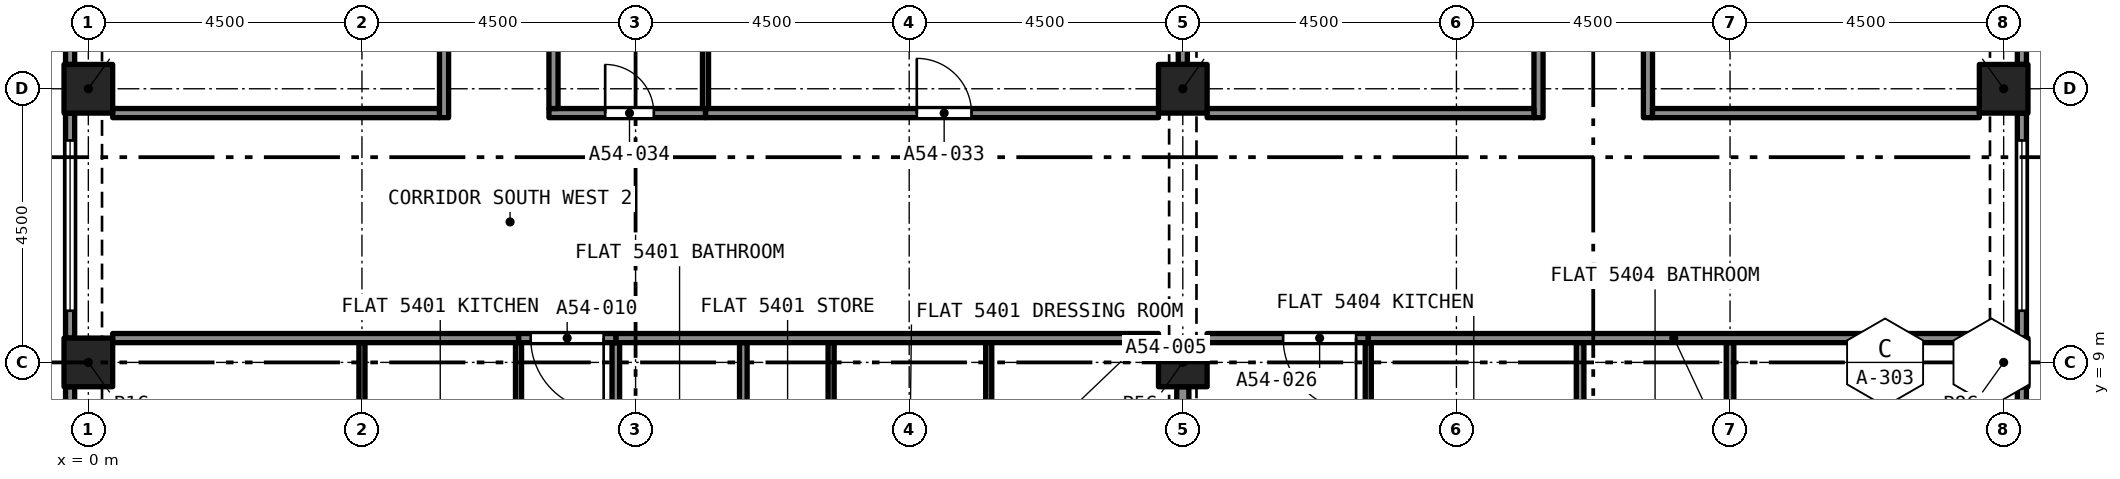
"""IFC4 building model, lengths in metres.
Left out: names, types, materials, properties, quantities, classifications, styles, units other than length and angle.
Written with IfcOpenShell. Run it as: python <this file> out.ifc"""

import sys

from ifc_helpers import new_model, si_unit, direction, frame, frame_2d, origin, origin_2d, place, context, subcontext, project, spatial, rectangle, extrude, element, fill, save


model = new_model("IFC4")
c1 = context("Model", 3, precision=1e-05, world=origin(), true_north=direction((0.0, 1.0)))
c2 = subcontext(c1, "Body", "Model", "MODEL_VIEW")
j1 = project(units=[si_unit("LENGTHUNIT", "METRE"), si_unit("PLANEANGLEUNIT", "RADIAN")], contexts=[c1])
p1 = place(None, origin())
s1 = spatial("IfcSite", under=j1, at=p1, CompositionType="ELEMENT")
p2 = place(p1, origin())
s2 = spatial("IfcBuilding", under=s1, at=p2, CompositionType="ELEMENT")
p3 = place(p2, frame((0.0, 0.0, 195.5)))
s3 = spatial("IfcBuildingStorey", under=s2, at=p3, CompositionType="ELEMENT", Elevation=195.5)
for number, where, z_axis, x_axis in (
    (1, (0.0, 9.0, 0.0), (0.0, 0.0, 1.0), (1.0, 0.0, 0.0)),
    (2, (18.0, 9.0, 0.0), (0.0, 0.0, 1.0), (1.0, 0.0, 0.0)),
    (3, (31.5, 9.0, 0.0), (0.0, 0.0, 1.0), (1.0, 0.0, 0.0)),
    (4, (0.0, 13.5, 0.0), (0.0, 0.0, 1.0), (1.0, 0.0, 0.0)),
    (5, (18.0, 13.5, 0.0), (0.0, 0.0, 1.0), (1.0, 0.0, 0.0)),
    (6, (31.5, 13.5, 0.0), (0.0, 0.0, 1.0), (1.0, 0.0, 0.0)),
):
    element("IfcColumn", number, at=place(p3, frame(where, z_axis=z_axis, x_axis=x_axis)), inside=s3, PredefinedType="COLUMN", context=c2, shape_type="SweptSolid", body=[
        extrude(rectangle(XDim=0.8, YDim=0.8, at=origin_2d()), origin(), (0.0, 0.0, 1.0), 3.2),
    ])
p4 = place(p3, frame((31.8, 8.6, 0.0), z_axis=(0.0, 0.0, 1.0), x_axis=(0.0, -1.0, 0.0)))
e7 = element("IfcWall", 7, at=p4, inside=s3, PredefinedType="SOLIDWALL", context=c2, shape_type="SweptSolid", body=[
    extrude(rectangle(XDim=3.7, YDim=0.15, at=frame_2d((1.85, 0.0))), origin(), (0.0, 0.0, 1.0), 3.2),
])
p5 = place(p4, frame((0.45, 0.0, 0.45)))
e8 = element("IfcOpeningElement", 8, at=p5, cuts=e7, PredefinedType="OPENING", context=c2, shape_type="SweptSolid", body=[
    extrude(rectangle(XDim=2.8, YDim=1.95, at=frame_2d((1.4, 0.975))), frame((0.0, 0.085, 0.0), z_axis=(0.0, -1.0, 0.0), x_axis=(1.0, 0.0, 0.0)), (0.0, 0.0, 1.0), 0.17),
])
p6 = place(p3, frame((31.8, 13.1, 0.0), z_axis=(0.0, 0.0, 1.0), x_axis=(0.0, -1.0, 0.0)))
e9 = element("IfcWall", 9, at=p6, inside=s3, PredefinedType="SOLIDWALL", context=c2, shape_type="SweptSolid", body=[
    extrude(rectangle(XDim=3.7, YDim=0.15, at=frame_2d((1.85, 0.0))), origin(), (0.0, 0.0, 1.0), 3.2),
])
p7 = place(p6, frame((0.45, 0.0, 0.45)))
e10 = element("IfcOpeningElement", 10, at=p7, cuts=e9, PredefinedType="OPENING", context=c2, shape_type="SweptSolid", body=[
    extrude(rectangle(XDim=2.8, YDim=1.95, at=frame_2d((1.4, 0.975))), frame((0.0, 0.085, 0.0), z_axis=(0.0, -1.0, 0.0), x_axis=(1.0, 0.0, 0.0)), (0.0, 0.0, 1.0), 0.17),
])
p8 = place(p3, frame((31.8, 17.6, 0.0), z_axis=(0.0, 0.0, 1.0), x_axis=(0.0, -1.0, 0.0)))
e11 = element("IfcWall", 11, at=p8, inside=s3, PredefinedType="SOLIDWALL", context=c2, shape_type="SweptSolid", body=[
    extrude(rectangle(XDim=3.7, YDim=0.15, at=frame_2d((1.85, 0.0))), origin(), (0.0, 0.0, 1.0), 3.2),
])
p9 = place(p8, frame((0.45, 0.0, 0.45)))
e12 = element("IfcOpeningElement", 12, at=p9, cuts=e11, PredefinedType="OPENING", context=c2, shape_type="SweptSolid", body=[
    extrude(rectangle(XDim=2.8, YDim=1.95, at=frame_2d((1.4, 0.975))), frame((0.0, 0.085, 0.0), z_axis=(0.0, -1.0, 0.0), x_axis=(1.0, 0.0, 0.0)), (0.0, 0.0, 1.0), 0.17),
])
p10 = place(p3, frame((-0.3, 13.9, 0.0), z_axis=(0.0, 0.0, 1.0), x_axis=(0.0, 1.0, 0.0)))
e13 = element("IfcWall", 13, at=p10, inside=s3, PredefinedType="SOLIDWALL", context=c2, shape_type="SweptSolid", body=[
    extrude(rectangle(XDim=3.7, YDim=0.15, at=frame_2d((1.85, 0.0))), origin(), (0.0, 0.0, 1.0), 3.2),
])
p11 = place(p10, frame((0.45, 0.0, 0.45)))
e14 = element("IfcOpeningElement", 14, at=p11, cuts=e13, PredefinedType="OPENING", context=c2, shape_type="SweptSolid", body=[
    extrude(rectangle(XDim=2.8, YDim=1.95, at=frame_2d((1.4, 0.975))), frame((0.0, 0.085, 0.0), z_axis=(0.0, -1.0, 0.0), x_axis=(1.0, 0.0, 0.0)), (0.0, 0.0, 1.0), 0.17),
])
p12 = place(p3, frame((-0.3, 9.4, 0.0), z_axis=(0.0, 0.0, 1.0), x_axis=(0.0, 1.0, 0.0)))
e15 = element("IfcWall", 15, at=p12, inside=s3, PredefinedType="SOLIDWALL", context=c2, shape_type="SweptSolid", body=[
    extrude(rectangle(XDim=3.7, YDim=0.15, at=frame_2d((1.85, 0.0))), origin(), (0.0, 0.0, 1.0), 3.2),
])
p13 = place(p12, frame((0.45, 0.0, 0.45)))
e16 = element("IfcOpeningElement", 16, at=p13, cuts=e15, PredefinedType="OPENING", context=c2, shape_type="SweptSolid", body=[
    extrude(rectangle(XDim=2.8, YDim=1.95, at=frame_2d((1.4, 0.975))), frame((0.0, 0.085, 0.0), z_axis=(0.0, -1.0, 0.0), x_axis=(1.0, 0.0, 0.0)), (0.0, 0.0, 1.0), 0.17),
])
p14 = place(p3, frame((-0.3, 4.9, 0.0), z_axis=(0.0, 0.0, 1.0), x_axis=(0.0, 1.0, 0.0)))
e17 = element("IfcWall", 17, at=p14, inside=s3, PredefinedType="SOLIDWALL", context=c2, shape_type="SweptSolid", body=[
    extrude(rectangle(XDim=3.7, YDim=0.15, at=frame_2d((1.85, 0.0))), origin(), (0.0, 0.0, 1.0), 3.2),
])
p15 = place(p14, frame((0.45, 0.0, 0.45)))
e18 = element("IfcOpeningElement", 18, at=p15, cuts=e17, PredefinedType="OPENING", context=c2, shape_type="SweptSolid", body=[
    extrude(rectangle(XDim=2.8, YDim=1.95, at=frame_2d((1.4, 0.975))), frame((0.0, 0.085, 0.0), z_axis=(0.0, -1.0, 0.0), x_axis=(1.0, 0.0, 0.0)), (0.0, 0.0, 1.0), 0.17),
])
for number, where, z_axis, x_axis in (
    (19, (8.675, 5.762, 0.0), (0.0, 0.0, 1.0), (0.0, 1.0, 0.0)),
    (20, (10.772, 5.762, 0.0), (0.0, 0.0, 1.0), (0.0, 1.0, 0.0)),
):
    element("IfcWall", number, at=place(p3, frame(where, z_axis=z_axis, x_axis=x_axis)), inside=s3, PredefinedType="PARTITIONING", context=c2, shape_type="SweptSolid", body=[
        extrude(rectangle(XDim=3.562, YDim=0.125, at=frame_2d((1.781, 0.0))), origin(), (0.0, 0.0, 1.0), 2.9),
    ])
p16 = place(p3, frame((8.675, 9.4, 0.0), z_axis=(0.0, 0.0, 1.0), x_axis=(1.0, 0.0, 0.0)))
e21 = element("IfcWall", 21, at=p16, inside=s3, PredefinedType="PARTITIONING", context=c2, shape_type="SweptSolid", body=[
    extrude(rectangle(XDim=8.925, YDim=0.15, at=frame_2d((4.462, 0.0))), origin(), (0.0, 0.0, 1.0), 2.9),
])
for number, where, z_axis, x_axis in (
    (22, (12.216, 5.75, 0.0), (0.0, 0.0, 1.0), (0.0, 1.0, 0.0)),
    (23, (14.808, 5.75, 0.0), (0.0, 0.0, 1.0), (0.0, 1.0, 0.0)),
    (24, (7.075, 5.75, 0.0), (0.0, 0.0, 1.0), (0.0, 1.0, 0.0)),
):
    element("IfcWall", number, at=place(p3, frame(where, z_axis=z_axis, x_axis=x_axis)), inside=s3, PredefinedType="PARTITIONING", context=c2, shape_type="SweptSolid", body=[
        extrude(rectangle(XDim=3.575, YDim=0.1, at=frame_2d((1.788, 0.0))), origin(), (0.0, 0.0, 1.0), 2.9),
    ])
p17 = place(p3, frame((18.0, 4.9, 0.0), z_axis=(0.0, 0.0, 1.0), x_axis=(0.0, 1.0, 0.0)))
e25 = element("IfcWall", 25, at=p17, inside=s3, PredefinedType="PARTITIONING", context=c2, shape_type="SweptSolid", body=[
    extrude(rectangle(XDim=3.7, YDim=0.2, at=frame_2d((1.85, 0.0))), origin(), (0.0, 0.0, 1.0), 2.38),
])
p18 = place(p3, frame((8.675, 9.4, 0.0), z_axis=(0.0, 0.0, 1.0), x_axis=(-1.0, 0.0, 0.0)))
e26 = element("IfcWall", 26, at=p18, inside=s3, PredefinedType="PARTITIONING", context=c2, shape_type="SweptSolid", body=[
    extrude(rectangle(XDim=1.6, YDim=0.15, at=frame_2d((0.8, 0.0))), origin(), (0.0, 0.0, 1.0), 2.9),
])
p19 = place(p18, frame((0.2, 0.0, 0.0)))
e27 = element("IfcOpeningElement", 27, at=p19, cuts=e26, PredefinedType="OPENING", context=c2, shape_type="SweptSolid", body=[
    extrude(rectangle(XDim=1.2, YDim=2.4, at=frame_2d((0.6, 1.2))), frame((0.0, 0.085, 0.0), z_axis=(0.0, -1.0, 0.0), x_axis=(1.0, 0.0, 0.0)), (0.0, 0.0, 1.0), 0.17),
])
p20 = place(p3, frame((4.5, 5.7, 0.0), z_axis=(0.0, 0.0, 1.0), x_axis=(0.0, 1.0, 0.0)))
e28 = element("IfcWall", 28, at=p20, inside=s3, PredefinedType="PARTITIONING", context=c2, shape_type="SweptSolid", body=[
    extrude(rectangle(XDim=3.625, YDim=0.1, at=frame_2d((1.812, 0.0))), origin(), (0.0, 0.0, 1.0), 2.9),
])
p21 = place(p3, frame((0.4, 9.4, 0.0), z_axis=(0.0, 0.0, 1.0), x_axis=(1.0, 0.0, 0.0)))
e29 = element("IfcWall", 29, at=p21, inside=s3, PredefinedType="PARTITIONING", context=c2, shape_type="SweptSolid", body=[
    extrude(rectangle(XDim=6.675, YDim=0.15, at=frame_2d((3.337, 0.0))), origin(), (0.0, 0.0, 1.0), 2.9),
])
p22 = place(p3, frame((24.534, 5.002, 0.0), z_axis=(0.0, 0.0, 1.0), x_axis=(0.0, 1.0, 0.0)))
e30 = element("IfcWall", 30, at=p22, inside=s3, PredefinedType="PARTITIONING", context=c2, shape_type="SweptSolid", body=[
    extrude(rectangle(XDim=4.323, YDim=0.125, at=frame_2d((2.161, 0.0))), origin(), (0.0, 0.0, 1.0), 2.75),
])
p23 = place(p3, frame((27.0, 4.94, 0.0), z_axis=(0.0, 0.0, 1.0), x_axis=(0.0, 1.0, 0.0)))
e31 = element("IfcWall", 31, at=p23, inside=s3, PredefinedType="PARTITIONING", context=c2, shape_type="SweptSolid", body=[
    extrude(rectangle(XDim=4.385, YDim=0.125, at=frame_2d((2.192, 0.0))), origin(), (0.0, 0.0, 1.0), 2.75),
])
p24 = place(p3, frame((21.05, 4.99, 0.0), z_axis=(0.0, 0.0, 1.0), x_axis=(0.0, 1.0, 0.0)))
e32 = element("IfcWall", 32, at=p24, inside=s3, PredefinedType="PARTITIONING", context=c2, shape_type="SweptSolid", body=[
    extrude(rectangle(XDim=4.335, YDim=0.1, at=frame_2d((2.167, 0.0))), origin(), (0.0, 0.0, 1.0), 2.75),
])
p25 = place(p3, frame((21.05, 9.4, 0.0), z_axis=(0.0, 0.0, 1.0), x_axis=(-1.0, 0.0, 0.0)))
e33 = element("IfcWall", 33, at=p25, inside=s3, PredefinedType="PARTITIONING", context=c2, shape_type="SweptSolid", body=[
    extrude(rectangle(XDim=2.65, YDim=0.15, at=frame_2d((1.325, 0.0))), origin(), (0.0, 0.0, 1.0), 2.75),
])
p26 = place(p25, frame((0.2, 0.0, 0.0)))
e34 = element("IfcOpeningElement", 34, at=p26, cuts=e33, PredefinedType="OPENING", context=c2, shape_type="SweptSolid", body=[
    extrude(rectangle(XDim=1.2, YDim=2.4, at=frame_2d((0.6, 1.2))), frame((0.0, 0.085, 0.0), z_axis=(0.0, -1.0, 0.0), x_axis=(1.0, 0.0, 0.0)), (0.0, 0.0, 1.0), 0.17),
])
p27 = place(p3, frame((21.05, 9.4, 0.0), z_axis=(0.0, 0.0, 1.0), x_axis=(1.0, 0.0, 0.0)))
e35 = element("IfcWall", 35, at=p27, inside=s3, PredefinedType="PARTITIONING", context=c2, shape_type="SweptSolid", body=[
    extrude(rectangle(XDim=10.05, YDim=0.15, at=frame_2d((5.025, 0.0))), origin(), (0.0, 0.0, 1.0), 2.75),
])
p28 = place(p3, frame((23.85, 13.025, 0.0), z_axis=(0.0, 0.0, 1.0), x_axis=(0.0, 1.0, 0.0)))
e36 = element("IfcWall", 36, at=p28, inside=s3, PredefinedType="PARTITIONING", context=c2, shape_type="SweptSolid", body=[
    extrude(rectangle(XDim=9.55, YDim=0.15, at=frame_2d((4.775, 0.0))), origin(), (0.0, 0.0, 1.0), 2.75),
])
p29 = place(p28, frame((4.275, 0.0, 0.0)))
e37 = element("IfcOpeningElement", 37, at=p29, cuts=e36, PredefinedType="OPENING", context=c2, shape_type="SweptSolid", body=[
    extrude(rectangle(XDim=1.0, YDim=2.1, at=frame_2d((0.5, 1.05))), frame((0.0, 0.085, 0.0), z_axis=(0.0, -1.0, 0.0), x_axis=(1.0, 0.0, 0.0)), (0.0, 0.0, 1.0), 0.17),
])
p30 = place(p3, frame((25.65, 22.575, 0.0), z_axis=(0.0, 0.0, 1.0), x_axis=(0.0, -1.0, 0.0)))
e38 = element("IfcWall", 38, at=p30, inside=s3, PredefinedType="PARTITIONING", context=c2, shape_type="SweptSolid", body=[
    extrude(rectangle(XDim=9.55, YDim=0.15, at=frame_2d((4.775, 0.0))), origin(), (0.0, 0.0, 1.0), 2.75),
])
p31 = place(p30, frame((4.275, 0.0, 0.0)))
e39 = element("IfcOpeningElement", 39, at=p31, cuts=e38, PredefinedType="OPENING", context=c2, shape_type="SweptSolid", body=[
    extrude(rectangle(XDim=1.0, YDim=2.1, at=frame_2d((0.5, 1.05))), frame((0.0, 0.085, 0.0), z_axis=(0.0, -1.0, 0.0), x_axis=(1.0, 0.0, 0.0)), (0.0, 0.0, 1.0), 0.17),
])
for number, where, z_axis, x_axis in (
    (40, (18.4, 13.1, 0.0), (0.0, 0.0, 1.0), (1.0, 0.0, 0.0)),
    (41, (25.725, 13.1, 0.0), (0.0, 0.0, 1.0), (1.0, 0.0, 0.0)),
):
    element("IfcWall", number, at=place(p3, frame(where, z_axis=z_axis, x_axis=x_axis)), inside=s3, PredefinedType="PARTITIONING", context=c2, shape_type="SweptSolid", body=[
        extrude(rectangle(XDim=5.375, YDim=0.15, at=frame_2d((2.688, 0.0))), origin(), (0.0, 0.0, 1.0), 2.75),
    ])
p32 = place(p3, frame((10.15, 13.1, 0.0), z_axis=(0.0, 0.0, 1.0), x_axis=(1.0, 0.0, 0.0)))
e42 = element("IfcWall", 42, at=p32, inside=s3, PredefinedType="PARTITIONING", context=c2, shape_type="SweptSolid", body=[
    extrude(rectangle(XDim=7.45, YDim=0.15, at=frame_2d((3.725, 0.0))), origin(), (0.0, 0.0, 1.0), 2.9),
])
p33 = place(p32, frame((3.475, 0.0, 0.0)))
e43 = element("IfcOpeningElement", 43, at=p33, cuts=e42, PredefinedType="OPENING", context=c2, shape_type="SweptSolid", body=[
    extrude(rectangle(XDim=0.9, YDim=2.1, at=frame_2d((0.45, 1.05))), frame((0.0, 0.085, 0.0), z_axis=(0.0, -1.0, 0.0), x_axis=(1.0, 0.0, 0.0)), (0.0, 0.0, 1.0), 0.17),
])
p34 = place(p3, frame((7.575, 13.1, 0.0), z_axis=(0.0, 0.0, 1.0), x_axis=(1.0, 0.0, 0.0)))
e44 = element("IfcWall", 44, at=p34, inside=s3, PredefinedType="PARTITIONING", context=c2, shape_type="SweptSolid", body=[
    extrude(rectangle(XDim=2.575, YDim=0.15, at=frame_2d((1.288, 0.0))), origin(), (0.0, 0.0, 1.0), 2.9),
])
p35 = place(p34, frame((0.925, 0.0, 0.0)))
e45 = element("IfcOpeningElement", 45, at=p35, cuts=e44, PredefinedType="OPENING", context=c2, shape_type="SweptSolid", body=[
    extrude(rectangle(XDim=0.8, YDim=2.1, at=frame_2d((0.4, 1.05))), frame((0.0, 0.085, 0.0), z_axis=(0.0, -1.0, 0.0), x_axis=(1.0, 0.0, 0.0)), (0.0, 0.0, 1.0), 0.17),
])
p36 = place(p3, frame((0.4, 13.1, 0.0), z_axis=(0.0, 0.0, 1.0), x_axis=(1.0, 0.0, 0.0)))
e46 = element("IfcWall", 46, at=p36, inside=s3, PredefinedType="PARTITIONING", context=c2, shape_type="SweptSolid", body=[
    extrude(rectangle(XDim=5.375, YDim=0.15, at=frame_2d((2.688, 0.0))), origin(), (0.0, 0.0, 1.0), 2.9),
])
p37 = place(p3, frame((18.0, 13.9, 0.0), z_axis=(0.0, 0.0, 1.0), x_axis=(0.0, 1.0, 0.0)))
e47 = element("IfcWall", 47, at=p37, inside=s3, PredefinedType="PARTITIONING", context=c2, shape_type="SweptSolid", body=[
    extrude(rectangle(XDim=1.8, YDim=0.15, at=frame_2d((0.9, 0.0))), origin(), (0.0, 0.0, 1.0), 2.38),
])
p38 = place(p3, frame((7.65, 13.175, 0.0), z_axis=(0.0, 0.0, 1.0), x_axis=(0.0, 1.0, 0.0)))
e48 = element("IfcWall", 48, at=p38, inside=s3, PredefinedType="PARTITIONING", context=c2, shape_type="SweptSolid", body=[
    extrude(rectangle(XDim=2.525, YDim=0.15, at=frame_2d((1.262, 0.0))), origin(), (0.0, 0.0, 1.0), 2.9),
])
p39 = place(p3, frame((5.85, 13.025, 0.0), z_axis=(0.0, 0.0, 1.0), x_axis=(0.0, 1.0, 0.0)))
e49 = element("IfcWall", 49, at=p39, inside=s3, PredefinedType="PARTITIONING", context=c2, shape_type="SweptSolid", body=[
    extrude(rectangle(XDim=9.475, YDim=0.15, at=frame_2d((4.738, 0.0))), origin(), (0.0, 0.0, 1.0), 2.9),
])
p40 = place(p39, frame((4.275, 0.0, 0.0)))
e50 = element("IfcOpeningElement", 50, at=p40, cuts=e49, PredefinedType="OPENING", context=c2, shape_type="SweptSolid", body=[
    extrude(rectangle(XDim=1.0, YDim=2.1, at=frame_2d((0.5, 1.05))), frame((0.0, 0.085, 0.0), z_axis=(0.0, -1.0, 0.0), x_axis=(1.0, 0.0, 0.0)), (0.0, 0.0, 1.0), 0.17),
])
p41 = place(p3, frame((10.15, 13.175, 0.0), z_axis=(0.0, 0.0, 1.0), x_axis=(0.0, 1.0, 0.0)))
e51 = element("IfcWall", 51, at=p41, inside=s3, PredefinedType="PARTITIONING", context=c2, shape_type="SweptSolid", body=[
    extrude(rectangle(XDim=2.45, YDim=0.1, at=frame_2d((1.225, 0.0))), origin(), (0.0, 0.0, 1.0), 2.9),
])
p42 = place(p7, origin())
e52 = element("IfcWindow", 52, at=p42, inside=s3, PartitioningType="SINGLE_PANEL", PredefinedType="WINDOW", context=c2, shape_type="SweptSolid", body=[
    extrude(rectangle(XDim=2.8, YDim=1.95, at=frame_2d((1.4, 0.975))), frame((0.0, 0.03, 0.0), z_axis=(0.0, -1.0, 0.0), x_axis=(1.0, 0.0, 0.0)), (0.0, 0.0, 1.0), 0.06),
])
fill(e10, e52)
p43 = place(p13, origin())
e53 = element("IfcWindow", 53, at=p43, inside=s3, PartitioningType="SINGLE_PANEL", PredefinedType="WINDOW", context=c2, shape_type="SweptSolid", body=[
    extrude(rectangle(XDim=2.8, YDim=1.95, at=frame_2d((1.4, 0.975))), frame((0.0, 0.03, 0.0), z_axis=(0.0, -1.0, 0.0), x_axis=(1.0, 0.0, 0.0)), (0.0, 0.0, 1.0), 0.06),
])
fill(e16, e53)
p44 = place(p19, origin())
e54 = element("IfcDoor", 54, at=p44, inside=s3, OperationType="SINGLE_SWING_RIGHT", PredefinedType="DOOR", context=c2, shape_type="SweptSolid", body=[
    extrude(rectangle(XDim=1.2, YDim=2.4, at=frame_2d((0.6, 1.2))), frame((0.0, 0.025, 0.0), z_axis=(0.0, -1.0, 0.0), x_axis=(1.0, 0.0, 0.0)), (0.0, 0.0, 1.0), 0.05),
])
fill(e27, e54)
p45 = place(p26, origin())
e55 = element("IfcDoor", 55, at=p45, inside=s3, OperationType="SINGLE_SWING_LEFT", PredefinedType="DOOR", context=c2, shape_type="SweptSolid", body=[
    extrude(rectangle(XDim=1.2, YDim=2.4, at=frame_2d((0.6, 1.2))), frame((0.0, 0.025, 0.0), z_axis=(0.0, -1.0, 0.0), x_axis=(1.0, 0.0, 0.0)), (0.0, 0.0, 1.0), 0.05),
])
fill(e34, e55)
p46 = place(p33, origin())
e56 = element("IfcDoor", 56, at=p46, inside=s3, OperationType="SINGLE_SWING_RIGHT", PredefinedType="DOOR", context=c2, shape_type="SweptSolid", body=[
    extrude(rectangle(XDim=0.9, YDim=2.1, at=frame_2d((0.45, 1.05))), frame((0.0, 0.025, 0.0), z_axis=(0.0, -1.0, 0.0), x_axis=(1.0, 0.0, 0.0)), (0.0, 0.0, 1.0), 0.05),
])
fill(e43, e56)
p47 = place(p35, origin())
e57 = element("IfcDoor", 57, at=p47, inside=s3, OperationType="SINGLE_SWING_RIGHT", PredefinedType="DOOR", context=c2, shape_type="SweptSolid", body=[
    extrude(rectangle(XDim=0.8, YDim=2.1, at=frame_2d((0.4, 1.05))), frame((0.0, 0.025, 0.0), z_axis=(0.0, -1.0, 0.0), x_axis=(1.0, 0.0, 0.0)), (0.0, 0.0, 1.0), 0.05),
])
fill(e45, e57)
save(model, sys.argv[1])
